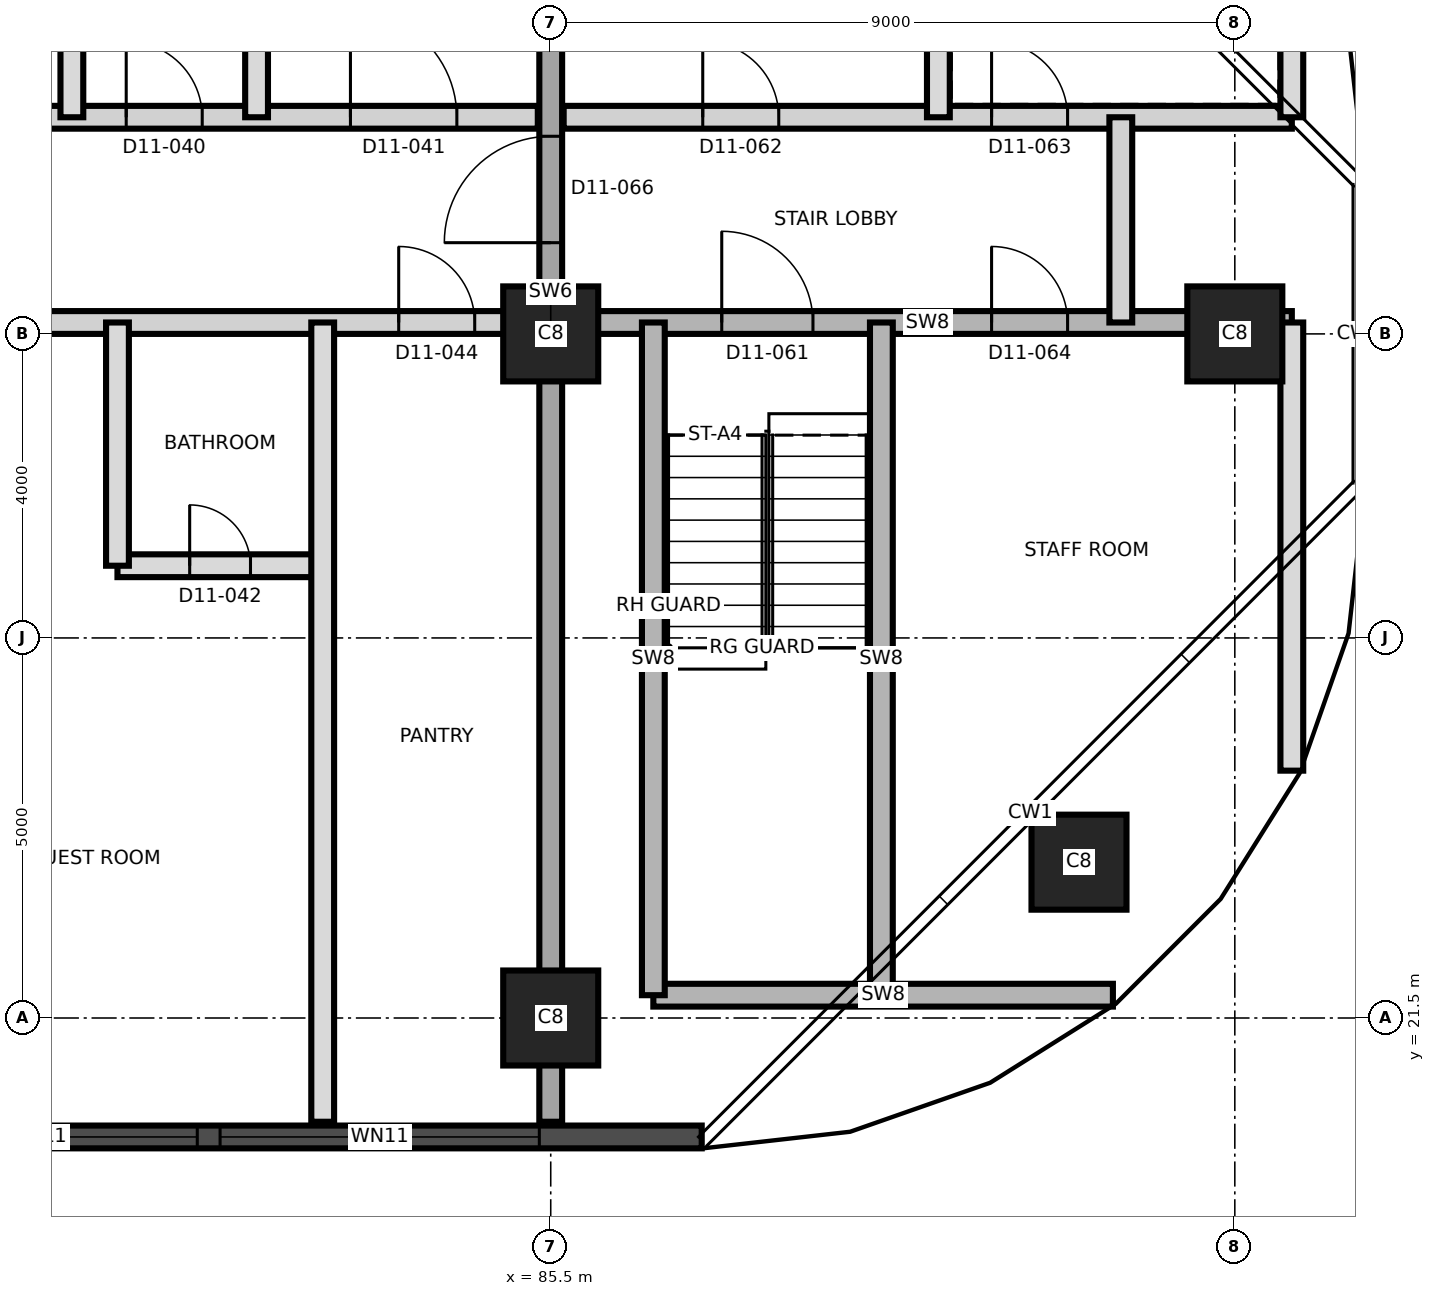
"""IFC4 building model, lengths in metres.
Left out: names, types, materials, properties, quantities, classifications, styles, units other than length and angle.
Written with IfcOpenShell. Run it as: python <this file> out.ifc"""

import sys

from ifc_helpers import new_model, si_unit, direction, frame, frame_2d, origin, origin_2d, place, context, subcontext, project, spatial, rectangle, extrude, element, fill, save


model = new_model("IFC4")
c1 = context("Model", 3, precision=1e-05, world=origin(), true_north=direction((0.0, 1.0)))
c2 = subcontext(c1, "Body", "Model", "MODEL_VIEW")
j1 = project(units=[si_unit("LENGTHUNIT", "METRE"), si_unit("PLANEANGLEUNIT", "RADIAN")], contexts=[c1])
p1 = place(None, origin())
s1 = spatial("IfcSite", under=j1, at=p1, CompositionType="ELEMENT")
p2 = place(p1, origin())
s2 = spatial("IfcBuilding", under=s1, at=p2, CompositionType="ELEMENT")
p3 = place(p2, frame((0.0, 0.0, 127.8)))
s3 = spatial("IfcBuildingStorey", under=s2, at=p3, CompositionType="ELEMENT", Elevation=127.8)
for number, where, z_axis, x_axis in (
    (1, (85.5, 21.5, 0.0), (0.0, 0.0, 1.0), (1.0, 0.0, 0.0)),
    (2, (92.45, 23.55, 0.0), (0.0, 0.0, 1.0), (1.0, 0.0, 0.0)),
    (3, (85.5, 30.5, 0.0), (0.0, 0.0, 1.0), (1.0, 0.0, 0.0)),
    (4, (94.5, 30.5, 0.0), (0.0, 0.0, 1.0), (1.0, 0.0, 0.0)),
):
    element("IfcColumn", number, at=place(p3, frame(where, z_axis=z_axis, x_axis=x_axis)), inside=s3, PredefinedType="COLUMN", context=c2, shape_type="SweptSolid", body=[
        extrude(rectangle(XDim=1.25, YDim=1.25, at=origin_2d()), origin(), (0.0, 0.0, 1.0), 3.7),
    ])
p4 = place(p3, frame((85.5, 20.135, 0.0), z_axis=(0.0, 0.0, 1.0), x_axis=(0.0, 1.0, 0.0)))
e5 = element("IfcWall", 5, at=p4, inside=s3, PredefinedType="SHEAR", context=c2, shape_type="SweptSolid", body=[
    extrude(rectangle(XDim=20.73, YDim=0.3, at=frame_2d((10.365, 0.0))), origin(), (0.0, 0.0, 1.0), 3.7),
])
p5 = place(p4, frame((11.565, 0.0, 0.0)))
e6 = element("IfcOpeningElement", 6, at=p5, cuts=e5, PredefinedType="OPENING", context=c2, shape_type="SweptSolid", body=[
    extrude(rectangle(XDim=1.4, YDim=2.1, at=frame_2d((0.7, 1.05))), frame((0.0, 0.16, 0.0), z_axis=(0.0, -1.0, 0.0), x_axis=(1.0, 0.0, 0.0)), (0.0, 0.0, 1.0), 0.32),
])
p6 = place(p3, frame((44.01, 19.935, 0.0), z_axis=(0.0, 0.0, 1.0), x_axis=(1.0, 0.0, 0.0)))
e7 = element("IfcWall", 7, at=p6, inside=s3, PredefinedType="SOLIDWALL", context=c2, shape_type="SweptSolid", body=[
    extrude(rectangle(XDim=43.477, YDim=0.3, at=frame_2d((21.738, 0.0))), origin(), (0.0, 0.0, 1.0), 3.4),
])
p7 = place(p6, frame((1.845, 0.0, 0.3)))
e8 = element("IfcOpeningElement", 8, at=p7, cuts=e7, PredefinedType="OPENING", context=c2, shape_type="SweptSolid", body=[
    extrude(rectangle(XDim=1.8, YDim=2.4, at=frame_2d((0.9, 1.2))), frame((0.0, 0.16, 0.0), z_axis=(0.0, -1.0, 0.0), x_axis=(1.0, 0.0, 0.0)), (0.0, 0.0, 1.0), 0.32),
])
p8 = place(p6, frame((5.64, 0.0, 0.9)))
e9 = element("IfcOpeningElement", 9, at=p8, cuts=e7, PredefinedType="OPENING", context=c2, shape_type="SweptSolid", body=[
    extrude(rectangle(XDim=4.2, YDim=1.5, at=frame_2d((2.1, 0.75))), frame((0.0, 0.16, 0.0), z_axis=(0.0, -1.0, 0.0), x_axis=(1.0, 0.0, 0.0)), (0.0, 0.0, 1.0), 0.32),
])
p9 = place(p6, frame((10.14, 0.0, 0.9)))
e10 = element("IfcOpeningElement", 10, at=p9, cuts=e7, PredefinedType="OPENING", context=c2, shape_type="SweptSolid", body=[
    extrude(rectangle(XDim=4.2, YDim=1.5, at=frame_2d((2.1, 0.75))), frame((0.0, 0.16, 0.0), z_axis=(0.0, -1.0, 0.0), x_axis=(1.0, 0.0, 0.0)), (0.0, 0.0, 1.0), 0.32),
])
p10 = place(p6, frame((14.64, 0.0, 0.9)))
e11 = element("IfcOpeningElement", 11, at=p10, cuts=e7, PredefinedType="OPENING", context=c2, shape_type="SweptSolid", body=[
    extrude(rectangle(XDim=4.2, YDim=1.5, at=frame_2d((2.1, 0.75))), frame((0.0, 0.16, 0.0), z_axis=(0.0, -1.0, 0.0), x_axis=(1.0, 0.0, 0.0)), (0.0, 0.0, 1.0), 0.32),
])
p11 = place(p6, frame((19.14, 0.0, 0.9)))
e12 = element("IfcOpeningElement", 12, at=p11, cuts=e7, PredefinedType="OPENING", context=c2, shape_type="SweptSolid", body=[
    extrude(rectangle(XDim=4.2, YDim=1.5, at=frame_2d((2.1, 0.75))), frame((0.0, 0.16, 0.0), z_axis=(0.0, -1.0, 0.0), x_axis=(1.0, 0.0, 0.0)), (0.0, 0.0, 1.0), 0.32),
])
p12 = place(p6, frame((23.64, 0.0, 0.9)))
e13 = element("IfcOpeningElement", 13, at=p12, cuts=e7, PredefinedType="OPENING", context=c2, shape_type="SweptSolid", body=[
    extrude(rectangle(XDim=4.2, YDim=1.5, at=frame_2d((2.1, 0.75))), frame((0.0, 0.16, 0.0), z_axis=(0.0, -1.0, 0.0), x_axis=(1.0, 0.0, 0.0)), (0.0, 0.0, 1.0), 0.32),
])
p13 = place(p6, frame((28.14, 0.0, 0.9)))
e14 = element("IfcOpeningElement", 14, at=p13, cuts=e7, PredefinedType="OPENING", context=c2, shape_type="SweptSolid", body=[
    extrude(rectangle(XDim=4.2, YDim=1.5, at=frame_2d((2.1, 0.75))), frame((0.0, 0.16, 0.0), z_axis=(0.0, -1.0, 0.0), x_axis=(1.0, 0.0, 0.0)), (0.0, 0.0, 1.0), 0.32),
])
p14 = place(p6, frame((32.64, 0.0, 0.9)))
e15 = element("IfcOpeningElement", 15, at=p14, cuts=e7, PredefinedType="OPENING", context=c2, shape_type="SweptSolid", body=[
    extrude(rectangle(XDim=4.2, YDim=1.5, at=frame_2d((2.1, 0.75))), frame((0.0, 0.16, 0.0), z_axis=(0.0, -1.0, 0.0), x_axis=(1.0, 0.0, 0.0)), (0.0, 0.0, 1.0), 0.32),
])
p15 = place(p6, frame((37.14, 0.0, 0.9)))
e16 = element("IfcOpeningElement", 16, at=p15, cuts=e7, PredefinedType="OPENING", context=c2, shape_type="SweptSolid", body=[
    extrude(rectangle(XDim=4.2, YDim=1.5, at=frame_2d((2.1, 0.75))), frame((0.0, 0.16, 0.0), z_axis=(0.0, -1.0, 0.0), x_axis=(1.0, 0.0, 0.0)), (0.0, 0.0, 1.0), 0.32),
])
p16 = place(p3, frame((86.85, 21.8, 0.0), z_axis=(0.0, 0.0, 1.0), x_axis=(1.0, 0.0, 0.0)))
e17 = element("IfcWall", 17, at=p16, inside=s3, PredefinedType="SHEAR", context=c2, shape_type="SweptSolid", body=[
    extrude(rectangle(XDim=6.046, YDim=0.3, at=frame_2d((3.023, 0.0))), origin(), (0.0, 0.0, 1.0), 3.4),
])
p17 = place(p3, frame((79.8, 27.45, 0.0), z_axis=(0.0, 0.0, 1.0), x_axis=(1.0, 0.0, 0.0)))
e18 = element("IfcWall", 18, at=p17, inside=s3, PredefinedType="PARTITIONING", context=c2, shape_type="SweptSolid", body=[
    extrude(rectangle(XDim=2.7, YDim=0.3, at=frame_2d((1.35, 0.0))), origin(), (0.0, 0.0, 1.0), 3.4),
])
p18 = place(p17, frame((0.95, 0.0, 0.0)))
e19 = element("IfcOpeningElement", 19, at=p18, cuts=e18, PredefinedType="OPENING", context=c2, shape_type="SweptSolid", body=[
    extrude(rectangle(XDim=0.8, YDim=2.1, at=frame_2d((0.4, 1.05))), frame((0.0, 0.16, 0.0), z_axis=(0.0, -1.0, 0.0), x_axis=(1.0, 0.0, 0.0)), (0.0, 0.0, 1.0), 0.32),
])
p19 = place(p3, frame((58.8, 30.65, 0.0), z_axis=(0.0, 0.0, 1.0), x_axis=(1.0, 0.0, 0.0)))
e20 = element("IfcWall", 20, at=p19, inside=s3, PredefinedType="PARTITIONING", context=c2, shape_type="SweptSolid", body=[
    extrude(rectangle(XDim=26.53, YDim=0.3, at=frame_2d((13.265, 0.0))), origin(), (0.0, 0.0, 1.0), 3.4),
])
p20 = place(p19, frame((3.115, 0.0, 0.0)))
e21 = element("IfcOpeningElement", 21, at=p20, cuts=e20, PredefinedType="OPENING", context=c2, shape_type="SweptSolid", body=[
    extrude(rectangle(XDim=1.0, YDim=2.1, at=frame_2d((0.5, 1.05))), frame((0.0, 0.16, 0.0), z_axis=(0.0, -1.0, 0.0), x_axis=(1.0, 0.0, 0.0)), (0.0, 0.0, 1.0), 0.32),
])
p21 = place(p19, frame((6.065, 0.0, 0.0)))
e22 = element("IfcOpeningElement", 22, at=p21, cuts=e20, PredefinedType="OPENING", context=c2, shape_type="SweptSolid", body=[
    extrude(rectangle(XDim=1.4, YDim=2.1, at=frame_2d((0.7, 1.05))), frame((0.0, 0.16, 0.0), z_axis=(0.0, -1.0, 0.0), x_axis=(1.0, 0.0, 0.0)), (0.0, 0.0, 1.0), 0.32),
])
p22 = place(p19, frame((12.7, 0.0, 0.0)))
e23 = element("IfcOpeningElement", 23, at=p22, cuts=e20, PredefinedType="OPENING", context=c2, shape_type="SweptSolid", body=[
    extrude(rectangle(XDim=1.0, YDim=2.4, at=frame_2d((0.5, 1.2))), frame((0.0, 0.16, 0.0), z_axis=(0.0, -1.0, 0.0), x_axis=(1.0, 0.0, 0.0)), (0.0, 0.0, 1.0), 0.32),
])
p23 = place(p19, frame((18.85, 0.0, 0.0)))
e24 = element("IfcOpeningElement", 24, at=p23, cuts=e20, PredefinedType="OPENING", context=c2, shape_type="SweptSolid", body=[
    extrude(rectangle(XDim=1.0, YDim=2.1, at=frame_2d((0.5, 1.05))), frame((0.0, 0.16, 0.0), z_axis=(0.0, -1.0, 0.0), x_axis=(1.0, 0.0, 0.0)), (0.0, 0.0, 1.0), 0.32),
])
p24 = place(p19, frame((24.7, 0.0, 0.0)))
e25 = element("IfcOpeningElement", 25, at=p24, cuts=e20, PredefinedType="OPENING", context=c2, shape_type="SweptSolid", body=[
    extrude(rectangle(XDim=1.0, YDim=2.1, at=frame_2d((0.5, 1.05))), frame((0.0, 0.16, 0.0), z_axis=(0.0, -1.0, 0.0), x_axis=(1.0, 0.0, 0.0)), (0.0, 0.0, 1.0), 0.32),
])
p25 = place(p3, frame((85.67, 30.65, 0.0), z_axis=(0.0, 0.0, 1.0), x_axis=(1.0, 0.0, 0.0)))
e26 = element("IfcWall", 26, at=p25, inside=s3, PredefinedType="SHEAR", context=c2, shape_type="SweptSolid", body=[
    extrude(rectangle(XDim=9.58, YDim=0.3, at=frame_2d((4.79, 0.0))), origin(), (0.0, 0.0, 1.0), 3.4),
])
p26 = place(p25, frame((2.08, 0.0, 0.0)))
e27 = element("IfcOpeningElement", 27, at=p26, cuts=e26, PredefinedType="OPENING", context=c2, shape_type="SweptSolid", body=[
    extrude(rectangle(XDim=1.2, YDim=2.1, at=frame_2d((0.6, 1.05))), frame((0.0, 0.16, 0.0), z_axis=(0.0, -1.0, 0.0), x_axis=(1.0, 0.0, 0.0)), (0.0, 0.0, 1.0), 0.32),
])
p27 = place(p25, frame((5.63, 0.0, 0.0)))
e28 = element("IfcOpeningElement", 28, at=p27, cuts=e26, PredefinedType="OPENING", context=c2, shape_type="SweptSolid", body=[
    extrude(rectangle(XDim=1.0, YDim=2.1, at=frame_2d((0.5, 1.05))), frame((0.0, 0.16, 0.0), z_axis=(0.0, -1.0, 0.0), x_axis=(1.0, 0.0, 0.0)), (0.0, 0.0, 1.0), 0.32),
])
p28 = place(p3, frame((58.8, 33.35, 0.0), z_axis=(0.0, 0.0, 1.0), x_axis=(1.0, 0.0, 0.0)))
e29 = element("IfcWall", 29, at=p28, inside=s3, PredefinedType="PARTITIONING", context=c2, shape_type="SweptSolid", body=[
    extrude(rectangle(XDim=26.53, YDim=0.3, at=frame_2d((13.265, 0.0))), origin(), (0.0, 0.0, 1.0), 3.4),
])
p29 = place(p28, frame((0.835, 0.0, 0.0)))
e30 = element("IfcOpeningElement", 30, at=p29, cuts=e29, PredefinedType="OPENING", context=c2, shape_type="SweptSolid", body=[
    extrude(rectangle(XDim=1.2, YDim=2.1, at=frame_2d((0.6, 1.05))), frame((0.0, 0.16, 0.0), z_axis=(0.0, -1.0, 0.0), x_axis=(1.0, 0.0, 0.0)), (0.0, 0.0, 1.0), 0.32),
])
p30 = place(p28, frame((4.085, 0.0, 0.0)))
e31 = element("IfcOpeningElement", 31, at=p30, cuts=e29, PredefinedType="OPENING", context=c2, shape_type="SweptSolid", body=[
    extrude(rectangle(XDim=1.0, YDim=2.1, at=frame_2d((0.5, 1.05))), frame((0.0, 0.16, 0.0), z_axis=(0.0, -1.0, 0.0), x_axis=(1.0, 0.0, 0.0)), (0.0, 0.0, 1.0), 0.32),
])
p31 = place(p28, frame((12.7, 0.0, 0.0)))
e32 = element("IfcOpeningElement", 32, at=p31, cuts=e29, PredefinedType="OPENING", context=c2, shape_type="SweptSolid", body=[
    extrude(rectangle(XDim=1.0, YDim=2.4, at=frame_2d((0.5, 1.2))), frame((0.0, 0.16, 0.0), z_axis=(0.0, -1.0, 0.0), x_axis=(1.0, 0.0, 0.0)), (0.0, 0.0, 1.0), 0.32),
])
p32 = place(p28, frame((21.115, 0.0, 0.0)))
e33 = element("IfcOpeningElement", 33, at=p32, cuts=e29, PredefinedType="OPENING", context=c2, shape_type="SweptSolid", body=[
    extrude(rectangle(XDim=1.0, YDim=2.1, at=frame_2d((0.5, 1.05))), frame((0.0, 0.16, 0.0), z_axis=(0.0, -1.0, 0.0), x_axis=(1.0, 0.0, 0.0)), (0.0, 0.0, 1.0), 0.32),
])
p33 = place(p28, frame((24.065, 0.0, 0.0)))
e34 = element("IfcOpeningElement", 34, at=p33, cuts=e29, PredefinedType="OPENING", context=c2, shape_type="SweptSolid", body=[
    extrude(rectangle(XDim=1.4, YDim=2.1, at=frame_2d((0.7, 1.05))), frame((0.0, 0.16, 0.0), z_axis=(0.0, -1.0, 0.0), x_axis=(1.0, 0.0, 0.0)), (0.0, 0.0, 1.0), 0.32),
])
p34 = place(p3, frame((85.67, 33.35, 0.0), z_axis=(0.0, 0.0, 1.0), x_axis=(1.0, 0.0, 0.0)))
e35 = element("IfcWall", 35, at=p34, inside=s3, PredefinedType="PARTITIONING", context=c2, shape_type="SweptSolid", body=[
    extrude(rectangle(XDim=9.58, YDim=0.3, at=frame_2d((4.79, 0.0))), origin(), (0.0, 0.0, 1.0), 3.4),
])
p35 = place(p34, frame((1.83, 0.0, 0.0)))
e36 = element("IfcOpeningElement", 36, at=p35, cuts=e35, PredefinedType="OPENING", context=c2, shape_type="SweptSolid", body=[
    extrude(rectangle(XDim=1.0, YDim=2.1, at=frame_2d((0.5, 1.05))), frame((0.0, 0.16, 0.0), z_axis=(0.0, -1.0, 0.0), x_axis=(1.0, 0.0, 0.0)), (0.0, 0.0, 1.0), 0.32),
])
p36 = place(p34, frame((5.63, 0.0, 0.0)))
e37 = element("IfcOpeningElement", 37, at=p36, cuts=e35, PredefinedType="OPENING", context=c2, shape_type="SweptSolid", body=[
    extrude(rectangle(XDim=1.0, YDim=2.1, at=frame_2d((0.5, 1.05))), frame((0.0, 0.16, 0.0), z_axis=(0.0, -1.0, 0.0), x_axis=(1.0, 0.0, 0.0)), (0.0, 0.0, 1.0), 0.32),
])
for number, where, z_axis, x_axis in (
    (38, (79.2, 33.35, 0.0), (0.0, 0.0, 1.0), (0.0, 1.0, 0.0)),
    (39, (79.8, 27.45, 0.0), (0.0, 0.0, 1.0), (0.0, 1.0, 0.0)),
):
    element("IfcWall", number, at=place(p3, frame(where, z_axis=z_axis, x_axis=x_axis)), inside=s3, PredefinedType="PARTITIONING", context=c2, shape_type="SweptSolid", body=[
        extrude(rectangle(XDim=3.2, YDim=0.3, at=frame_2d((1.6, 0.0))), origin(), (0.0, 0.0, 1.0), 3.4),
    ])
p37 = place(p3, frame((81.63, 33.35, 0.0), z_axis=(0.0, 0.0, 1.0), x_axis=(0.0, 1.0, 0.0)))
e40 = element("IfcWall", 40, at=p37, inside=s3, PredefinedType="PARTITIONING", context=c2, shape_type="SweptSolid", body=[
    extrude(rectangle(XDim=7.695, YDim=0.3, at=frame_2d((3.847, 0.0))), origin(), (0.0, 0.0, 1.0), 3.4),
])
p38 = place(p3, frame((82.5, 20.135, 0.0), z_axis=(0.0, 0.0, 1.0), x_axis=(0.0, 1.0, 0.0)))
e41 = element("IfcWall", 41, at=p38, inside=s3, PredefinedType="PARTITIONING", context=c2, shape_type="SweptSolid", body=[
    extrude(rectangle(XDim=10.515, YDim=0.3, at=frame_2d((5.257, 0.0))), origin(), (0.0, 0.0, 1.0), 3.4),
])
for number, where, z_axis, x_axis in (
    (42, (86.85, 21.8, 0.0), (0.0, 0.0, 1.0), (0.0, 1.0, 0.0)),
    (43, (89.85, 21.8, 0.0), (0.0, 0.0, 1.0), (0.0, 1.0, 0.0)),
):
    element("IfcWall", number, at=place(p3, frame(where, z_axis=z_axis, x_axis=x_axis)), inside=s3, PredefinedType="SHEAR", context=c2, shape_type="SweptSolid", body=[
        extrude(rectangle(XDim=8.85, YDim=0.3, at=frame_2d((4.425, 0.0))), origin(), (0.0, 0.0, 1.0), 3.4),
    ])
p39 = place(p3, frame((90.6, 33.35, 0.0), z_axis=(0.0, 0.0, 1.0), x_axis=(0.0, 1.0, 0.0)))
e44 = element("IfcWall", 44, at=p39, inside=s3, PredefinedType="PARTITIONING", context=c2, shape_type="SweptSolid", body=[
    extrude(rectangle(XDim=7.124, YDim=0.3, at=frame_2d((3.562, 0.0))), origin(), (0.0, 0.0, 1.0), 3.4),
])
p40 = place(p3, frame((93.0, 30.65, 0.0), z_axis=(0.0, 0.0, 1.0), x_axis=(0.0, 1.0, 0.0)))
e45 = element("IfcWall", 45, at=p40, inside=s3, PredefinedType="PARTITIONING", context=c2, shape_type="SweptSolid", body=[
    extrude(rectangle(XDim=2.7, YDim=0.3, at=frame_2d((1.35, 0.0))), origin(), (0.0, 0.0, 1.0), 3.4),
])
p41 = place(p3, frame((95.25, 24.754, 0.0), z_axis=(0.0, 0.0, 1.0), x_axis=(0.0, 1.0, 0.0)))
e46 = element("IfcWall", 46, at=p41, inside=s3, PredefinedType="PARTITIONING", context=c2, shape_type="SweptSolid", body=[
    extrude(rectangle(XDim=5.896, YDim=0.3, at=frame_2d((2.948, 0.0))), origin(), (0.0, 0.0, 1.0), 3.4),
])
p42 = place(p3, frame((95.25, 33.35, 0.0), z_axis=(0.0, 0.0, 1.0), x_axis=(0.0, 1.0, 0.0)))
e47 = element("IfcWall", 47, at=p42, inside=s3, PredefinedType="PARTITIONING", context=c2, shape_type="SweptSolid", body=[
    extrude(rectangle(XDim=2.896, YDim=0.3, at=frame_2d((1.448, 0.0))), origin(), (0.0, 0.0, 1.0), 3.4),
])
p43 = place(p14, origin())
e48 = element("IfcWindow", 48, at=p43, inside=s3, PartitioningType="SINGLE_PANEL", PredefinedType="WINDOW", context=c2, shape_type="SweptSolid", body=[
    extrude(rectangle(XDim=4.2, YDim=1.5, at=frame_2d((2.1, 0.75))), frame((0.0, 0.03, 0.0), z_axis=(0.0, -1.0, 0.0), x_axis=(1.0, 0.0, 0.0)), (0.0, 0.0, 1.0), 0.06),
])
fill(e15, e48)
p44 = place(p15, origin())
e49 = element("IfcWindow", 49, at=p44, inside=s3, PartitioningType="SINGLE_PANEL", PredefinedType="WINDOW", context=c2, shape_type="SweptSolid", body=[
    extrude(rectangle(XDim=4.2, YDim=1.5, at=frame_2d((2.1, 0.75))), frame((0.0, 0.03, 0.0), z_axis=(0.0, -1.0, 0.0), x_axis=(1.0, 0.0, 0.0)), (0.0, 0.0, 1.0), 0.06),
])
fill(e16, e49)
p45 = place(p32, origin())
e50 = element("IfcDoor", 50, at=p45, inside=s3, OperationType="SINGLE_SWING_LEFT", PredefinedType="DOOR", context=c2, shape_type="SweptSolid", body=[
    extrude(rectangle(XDim=1.0, YDim=2.1, at=frame_2d((0.5, 1.05))), frame((0.0, 0.025, 0.0), z_axis=(0.0, -1.0, 0.0), x_axis=(1.0, 0.0, 0.0)), (0.0, 0.0, 1.0), 0.05),
])
fill(e33, e50)
p46 = place(p33, origin())
e51 = element("IfcDoor", 51, at=p46, inside=s3, OperationType="SINGLE_SWING_RIGHT", PredefinedType="DOOR", context=c2, shape_type="SweptSolid", body=[
    extrude(rectangle(XDim=1.4, YDim=2.1, at=frame_2d((0.7, 1.05))), frame((0.0, 0.025, 0.0), z_axis=(0.0, -1.0, 0.0), x_axis=(1.0, 0.0, 0.0)), (0.0, 0.0, 1.0), 0.05),
])
fill(e34, e51)
p47 = place(p18, origin())
e52 = element("IfcDoor", 52, at=p47, inside=s3, OperationType="SINGLE_SWING_LEFT", PredefinedType="DOOR", context=c2, shape_type="SweptSolid", body=[
    extrude(rectangle(XDim=0.8, YDim=2.1, at=frame_2d((0.4, 1.05))), frame((0.0, 0.025, 0.0), z_axis=(0.0, -1.0, 0.0), x_axis=(1.0, 0.0, 0.0)), (0.0, 0.0, 1.0), 0.05),
])
fill(e19, e52)
p48 = place(p24, origin())
e53 = element("IfcDoor", 53, at=p48, inside=s3, OperationType="SINGLE_SWING_RIGHT", PredefinedType="DOOR", context=c2, shape_type="SweptSolid", body=[
    extrude(rectangle(XDim=1.0, YDim=2.1, at=frame_2d((0.5, 1.05))), frame((0.0, 0.025, 0.0), z_axis=(0.0, -1.0, 0.0), x_axis=(1.0, 0.0, 0.0)), (0.0, 0.0, 1.0), 0.05),
])
fill(e25, e53)
p49 = place(p26, origin())
e54 = element("IfcDoor", 54, at=p49, inside=s3, OperationType="SINGLE_SWING_LEFT", PredefinedType="DOOR", context=c2, shape_type="SweptSolid", body=[
    extrude(rectangle(XDim=1.2, YDim=2.1, at=frame_2d((0.6, 1.05))), frame((0.0, 0.025, 0.0), z_axis=(0.0, -1.0, 0.0), x_axis=(1.0, 0.0, 0.0)), (0.0, 0.0, 1.0), 0.05),
])
fill(e27, e54)
p50 = place(p35, origin())
e55 = element("IfcDoor", 55, at=p50, inside=s3, OperationType="SINGLE_SWING_LEFT", PredefinedType="DOOR", context=c2, shape_type="SweptSolid", body=[
    extrude(rectangle(XDim=1.0, YDim=2.1, at=frame_2d((0.5, 1.05))), frame((0.0, 0.025, 0.0), z_axis=(0.0, -1.0, 0.0), x_axis=(1.0, 0.0, 0.0)), (0.0, 0.0, 1.0), 0.05),
])
fill(e36, e55)
p51 = place(p36, origin())
e56 = element("IfcDoor", 56, at=p51, inside=s3, OperationType="SINGLE_SWING_RIGHT", PredefinedType="DOOR", context=c2, shape_type="SweptSolid", body=[
    extrude(rectangle(XDim=1.0, YDim=2.1, at=frame_2d((0.5, 1.05))), frame((0.0, 0.025, 0.0), z_axis=(0.0, -1.0, 0.0), x_axis=(1.0, 0.0, 0.0)), (0.0, 0.0, 1.0), 0.05),
])
fill(e37, e56)
p52 = place(p27, origin())
e57 = element("IfcDoor", 57, at=p52, inside=s3, OperationType="SINGLE_SWING_LEFT", PredefinedType="DOOR", context=c2, shape_type="SweptSolid", body=[
    extrude(rectangle(XDim=1.0, YDim=2.1, at=frame_2d((0.5, 1.05))), frame((0.0, 0.025, 0.0), z_axis=(0.0, -1.0, 0.0), x_axis=(1.0, 0.0, 0.0)), (0.0, 0.0, 1.0), 0.05),
])
fill(e28, e57)
p53 = place(p5, origin())
e58 = element("IfcDoor", 58, at=p53, inside=s3, OperationType="SINGLE_SWING_RIGHT", PredefinedType="DOOR", context=c2, shape_type="SweptSolid", body=[
    extrude(rectangle(XDim=1.4, YDim=2.1, at=frame_2d((0.7, 1.05))), frame((0.0, 0.025, 0.0), z_axis=(0.0, -1.0, 0.0), x_axis=(1.0, 0.0, 0.0)), (0.0, 0.0, 1.0), 0.05),
])
fill(e6, e58)
save(model, sys.argv[1])
